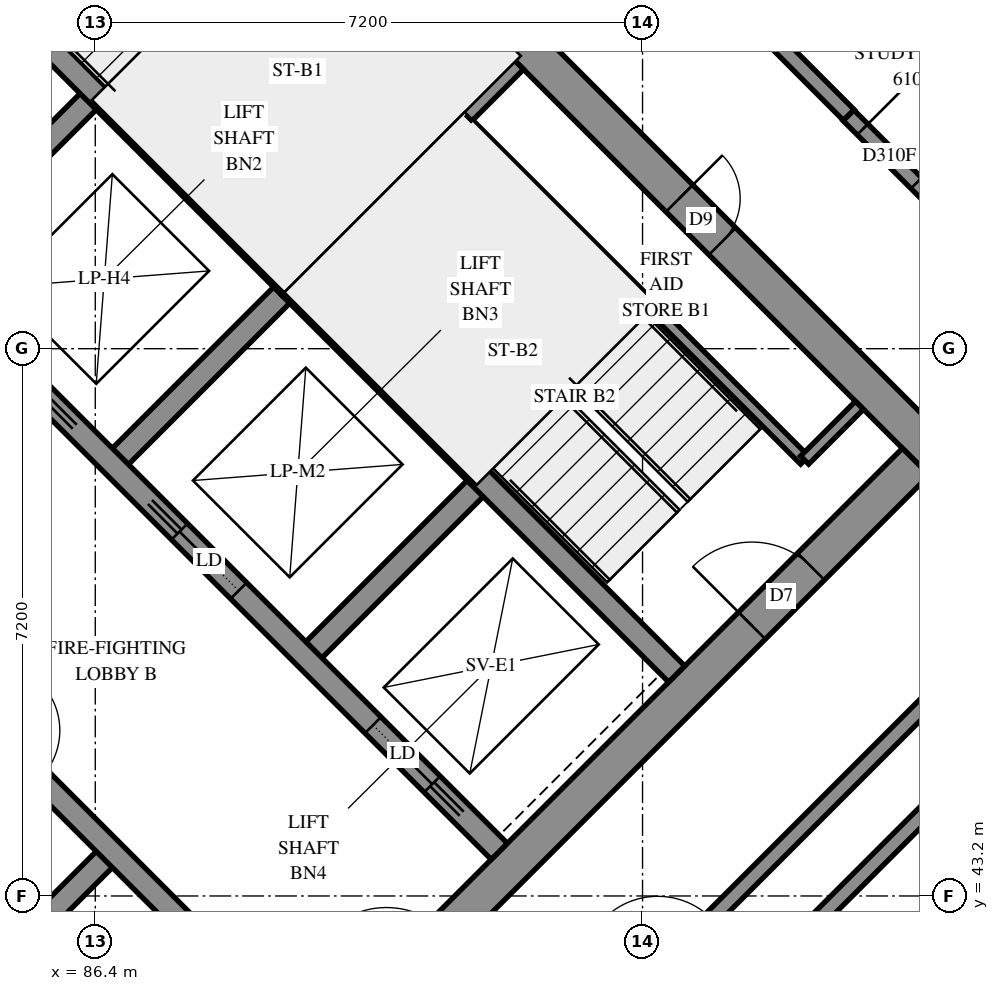
"""IFC4 building model, lengths in metres.
Left out: names, types, materials, properties, quantities, classifications, styles, units other than length and angle.
Written with IfcOpenShell. Run it as: python <this file> out.ifc"""

import sys

from ifc_helpers import new_model, si_unit, direction, frame, frame_2d, origin, place, context, subcontext, project, spatial, rectangle, extrude, element, fill, save


model = new_model("IFC4")
c1 = context("Model", 3, precision=1e-05, world=origin(), true_north=direction((0.0, 1.0)))
c2 = subcontext(c1, "Body", "Model", "MODEL_VIEW")
j1 = project(units=[si_unit("LENGTHUNIT", "METRE"), si_unit("PLANEANGLEUNIT", "RADIAN")], contexts=[c1])
p1 = place(None, origin())
s1 = spatial("IfcSite", under=j1, at=p1, CompositionType="ELEMENT")
p2 = place(p1, origin())
s2 = spatial("IfcBuilding", under=s1, at=p2, CompositionType="ELEMENT")
p3 = place(p2, frame((0.0, 0.0, 223.6)))
s3 = spatial("IfcBuildingStorey", under=s2, at=p3, CompositionType="ELEMENT", Elevation=223.6)
p4 = place(p3, frame((76.124, 49.267, -0.3), z_axis=(0.0, 0.0, 1.0), x_axis=(0.7071067812, -0.7071067812, 0.0)))
e1 = element("IfcWall", 1, at=p4, inside=s3, PredefinedType="SHEAR", context=c2, shape_type="SweptSolid", body=[
    extrude(rectangle(XDim=15.4, YDim=0.5, at=frame_2d((7.7, 0.0))), origin(), (0.0, 0.0, 1.0), 2.7),
])
p5 = place(p3, frame((86.66, 59.802, -0.3), z_axis=(0.0, 0.0, 1.0), x_axis=(0.7071067812, -0.7071067812, 0.0)))
e2 = element("IfcWall", 2, at=p5, inside=s3, PredefinedType="SHEAR", context=c2, shape_type="SweptSolid", body=[
    extrude(rectangle(XDim=15.4, YDim=0.5, at=frame_2d((7.7, 0.0))), origin(), (0.0, 0.0, 1.0), 2.7),
])
p6 = place(p5, frame((10.5, 0.0, 0.3)))
e3 = element("IfcOpeningElement", 3, at=p6, cuts=e2, PredefinedType="OPENING", context=c2, shape_type="SweptSolid", body=[
    extrude(rectangle(XDim=0.8, YDim=2.1, at=frame_2d((0.4, 1.05))), frame((0.0, 0.26, 0.0), z_axis=(0.0, -1.0, 0.0), x_axis=(1.0, 0.0, 0.0)), (0.0, 0.0, 1.0), 0.52),
])
p7 = place(p3, frame((76.478, 49.267, -0.3), z_axis=(0.0, 0.0, 1.0), x_axis=(0.7071067812, 0.7071067812, 0.0)))
e4 = element("IfcWall", 4, at=p7, inside=s3, PredefinedType="SHEAR", context=c2, shape_type="SweptSolid", body=[
    extrude(rectangle(XDim=14.4, YDim=0.5, at=frame_2d((7.2, 0.0))), origin(), (0.0, 0.0, 1.0), 2.7),
])
p8 = place(p7, frame((4.55, 0.0, 0.3)))
e5 = element("IfcOpeningElement", 5, at=p8, cuts=e4, PredefinedType="OPENING", context=c2, shape_type="SweptSolid", body=[
    extrude(rectangle(XDim=1.1, YDim=2.1, at=frame_2d((0.55, 1.05))), frame((0.0, 0.26, 0.0), z_axis=(0.0, -1.0, 0.0), x_axis=(1.0, 0.0, 0.0)), (0.0, 0.0, 1.0), 0.52),
])
p9 = place(p7, frame((11.35, 0.0, 0.3)))
e6 = element("IfcOpeningElement", 6, at=p9, cuts=e4, PredefinedType="OPENING", context=c2, shape_type="SweptSolid", body=[
    extrude(rectangle(XDim=1.1, YDim=2.1, at=frame_2d((0.55, 1.05))), frame((0.0, 0.26, 0.0), z_axis=(0.0, -1.0, 0.0), x_axis=(1.0, 0.0, 0.0)), (0.0, 0.0, 1.0), 0.52),
])
p10 = place(p3, frame((87.013, 38.731, -0.3), z_axis=(0.0, 0.0, 1.0), x_axis=(0.7071067812, 0.7071067812, 0.0)))
e7 = element("IfcWall", 7, at=p10, inside=s3, PredefinedType="SHEAR", context=c2, shape_type="SweptSolid", body=[
    extrude(rectangle(XDim=14.4, YDim=0.5, at=frame_2d((7.2, 0.0))), origin(), (0.0, 0.0, 1.0), 2.7),
])
p11 = place(p10, frame((4.55, 0.0, 0.3)))
e8 = element("IfcOpeningElement", 8, at=p11, cuts=e7, PredefinedType="OPENING", context=c2, shape_type="SweptSolid", body=[
    extrude(rectangle(XDim=1.1, YDim=2.1, at=frame_2d((0.55, 1.05))), frame((0.0, 0.26, 0.0), z_axis=(0.0, -1.0, 0.0), x_axis=(1.0, 0.0, 0.0)), (0.0, 0.0, 1.0), 0.52),
])
p12 = place(p10, frame((11.35, 0.0, 0.3)))
e9 = element("IfcOpeningElement", 9, at=p12, cuts=e7, PredefinedType="OPENING", context=c2, shape_type="SweptSolid", body=[
    extrude(rectangle(XDim=1.1, YDim=2.1, at=frame_2d((0.55, 1.05))), frame((0.0, 0.26, 0.0), z_axis=(0.0, -1.0, 0.0), x_axis=(1.0, 0.0, 0.0)), (0.0, 0.0, 1.0), 0.52),
])
p13 = place(p3, frame((84.079, 51.423, 0.0), z_axis=(0.0, 0.0, 1.0), x_axis=(0.7071219326, 0.7070916295, 0.0)))
e10 = element("IfcWall", 10, at=p13, inside=s3, PredefinedType="SOLIDWALL", context=c2, shape_type="SweptSolid", body=[
    extrude(rectangle(XDim=3.3, YDim=0.3, at=frame_2d((1.65, 0.0))), origin(), (0.0, 0.0, 1.0), 3.1),
])
p14 = place(p3, frame((86.625, 48.878, 0.0), z_axis=(0.0, 0.0, 1.0), x_axis=(0.7071067812, 0.7071067812, 0.0)))
e11 = element("IfcWall", 11, at=p14, inside=s3, PredefinedType="SOLIDWALL", context=c2, shape_type="SweptSolid", body=[
    extrude(rectangle(XDim=3.3, YDim=0.3, at=frame_2d((1.65, 0.0))), origin(), (0.0, 0.0, 1.0), 3.1),
])
p15 = place(p3, frame((84.291, 41.453, 0.0), z_axis=(0.0, 0.0, 1.0), x_axis=(0.7071067812, 0.7071067812, 0.0)))
e12 = element("IfcWall", 12, at=p15, inside=s3, PredefinedType="SOLIDWALL", context=c2, shape_type="SweptSolid", body=[
    extrude(rectangle(XDim=3.3, YDim=0.3, at=frame_2d((1.65, 0.0))), origin(), (0.0, 0.0, 1.0), 3.1),
])
p16 = place(p3, frame((89.17, 46.332, 0.0), z_axis=(0.0, 0.0, 1.0), x_axis=(0.7071067812, 0.7071067812, 0.0)))
e13 = element("IfcWall", 13, at=p16, inside=s3, PredefinedType="SOLIDWALL", context=c2, shape_type="SweptSolid", body=[
    extrude(rectangle(XDim=3.3, YDim=0.3, at=frame_2d((1.65, 0.0))), origin(), (0.0, 0.0, 1.0), 3.1),
])
p17 = place(p3, frame((78.988, 51.423, 0.0), z_axis=(0.0, 0.0, 1.0), x_axis=(0.7071067812, -0.7071067812, 0.0)))
e14 = element("IfcWall", 14, at=p17, inside=s3, PredefinedType="SOLIDWALL", context=c2, shape_type="SweptSolid", body=[
    extrude(rectangle(XDim=14.4, YDim=0.3, at=frame_2d((7.2, 0.0))), origin(), (0.0, 0.0, 1.0), 3.1),
])
p18 = place(p17, frame((1.35, 0.0, 0.0)))
e15 = element("IfcOpeningElement", 15, at=p18, cuts=e14, PredefinedType="OPENING", context=c2, shape_type="SweptSolid", body=[
    extrude(rectangle(XDim=0.9, YDim=2.1, at=frame_2d((0.45, 1.05))), frame((0.0, 0.16, 0.0), z_axis=(0.0, -1.0, 0.0), x_axis=(1.0, 0.0, 0.0)), (0.0, 0.0, 1.0), 0.32),
])
p19 = place(p17, frame((4.95, 0.0, 0.0)))
e16 = element("IfcOpeningElement", 16, at=p19, cuts=e14, PredefinedType="OPENING", context=c2, shape_type="SweptSolid", body=[
    extrude(rectangle(XDim=0.9, YDim=2.1, at=frame_2d((0.45, 1.05))), frame((0.0, 0.16, 0.0), z_axis=(0.0, -1.0, 0.0), x_axis=(1.0, 0.0, 0.0)), (0.0, 0.0, 1.0), 0.32),
])
p20 = place(p17, frame((8.55, 0.0, 0.0)))
e17 = element("IfcOpeningElement", 17, at=p20, cuts=e14, PredefinedType="OPENING", context=c2, shape_type="SweptSolid", body=[
    extrude(rectangle(XDim=0.9, YDim=2.1, at=frame_2d((0.45, 1.05))), frame((0.0, 0.16, 0.0), z_axis=(0.0, -1.0, 0.0), x_axis=(1.0, 0.0, 0.0)), (0.0, 0.0, 1.0), 0.32),
])
p21 = place(p17, frame((12.05, 0.0, 0.0)))
e18 = element("IfcOpeningElement", 18, at=p21, cuts=e14, PredefinedType="OPENING", context=c2, shape_type="SweptSolid", body=[
    extrude(rectangle(XDim=1.1, YDim=2.1, at=frame_2d((0.55, 1.05))), frame((0.0, 0.16, 0.0), z_axis=(0.0, -1.0, 0.0), x_axis=(1.0, 0.0, 0.0)), (0.0, 0.0, 1.0), 0.32),
])
p22 = place(p3, frame((81.534, 53.969, 0.0), z_axis=(0.0, 0.0, 1.0), x_axis=(0.707103309, -0.7071102534, 0.0)))
e19 = element("IfcWall", 19, at=p22, inside=s3, PredefinedType="SOLIDWALL", context=c2, shape_type="SweptSolid", body=[
    extrude(rectangle(XDim=14.4, YDim=0.3, at=frame_2d((7.2, 0.0))), origin(), (0.0, 0.0, 1.0), 3.1),
])
p23 = place(p22, frame((1.25, 0.0, 0.0)))
e20 = element("IfcOpeningElement", 20, at=p23, cuts=e19, PredefinedType="OPENING", context=c2, shape_type="SweptSolid", body=[
    extrude(rectangle(XDim=1.1, YDim=2.1, at=frame_2d((0.55, 1.05))), frame((0.0, 0.16, 0.0), z_axis=(0.0, -1.0, 0.0), x_axis=(1.0, 0.0, 0.0)), (0.0, 0.0, 1.0), 0.32),
])
p24 = place(p22, frame((4.85, 0.0, 0.0)))
e21 = element("IfcOpeningElement", 21, at=p24, cuts=e19, PredefinedType="OPENING", context=c2, shape_type="SweptSolid", body=[
    extrude(rectangle(XDim=1.1, YDim=2.1, at=frame_2d((0.55, 1.05))), frame((0.0, 0.16, 0.0), z_axis=(0.0, -1.0, 0.0), x_axis=(1.0, 0.0, 0.0)), (0.0, 0.0, 1.0), 0.32),
])
p25 = place(p22, frame((8.45, 0.0, 0.0)))
e22 = element("IfcOpeningElement", 22, at=p25, cuts=e19, PredefinedType="OPENING", context=c2, shape_type="SweptSolid", body=[
    extrude(rectangle(XDim=1.1, YDim=2.1, at=frame_2d((0.55, 1.05))), frame((0.0, 0.16, 0.0), z_axis=(0.0, -1.0, 0.0), x_axis=(1.0, 0.0, 0.0)), (0.0, 0.0, 1.0), 0.32),
])
p26 = place(p22, frame((12.05, 0.0, 0.0)))
e23 = element("IfcOpeningElement", 23, at=p26, cuts=e19, PredefinedType="OPENING", context=c2, shape_type="SweptSolid", body=[
    extrude(rectangle(XDim=1.1, YDim=2.1, at=frame_2d((0.55, 1.05))), frame((0.0, 0.16, 0.0), z_axis=(0.0, -1.0, 0.0), x_axis=(1.0, 0.0, 0.0)), (0.0, 0.0, 1.0), 0.32),
])
for number, where, z_axis, x_axis in (
    (24, (83.867, 56.302, 0.0), (0.0, 0.0, 1.0), (0.707, -0.707, 0.0)),
    (25, (88.958, 51.211, 0.0), (0.0, 0.0, 1.0), (0.707, -0.707, 0.0)),
):
    element("IfcWall", number, at=place(p3, frame(where, z_axis=z_axis, x_axis=x_axis)), inside=s3, PredefinedType="SOLIDWALL", context=c2, shape_type="SweptSolid", body=[
        extrude(rectangle(XDim=7.2, YDim=0.3, at=frame_2d((3.6, 0.0))), origin(), (0.0, 0.0, 1.0), 3.1),
    ])
p27 = place(p3, frame((88.958, 51.211, 0.0), z_axis=(0.0, 0.0, 1.0), x_axis=(0.7071067812, 0.7071067812, 0.0)))
e26 = element("IfcWall", 26, at=p27, inside=s3, PredefinedType="SOLIDWALL", context=c2, shape_type="SweptSolid", body=[
    extrude(rectangle(XDim=4.2, YDim=0.3, at=frame_2d((2.1, 0.0))), origin(), (0.0, 0.0, 1.0), 3.1),
])
p28 = place(p3, frame((91.313, 53.354, 0.0), z_axis=(0.0, 0.0, 1.0), x_axis=(0.7071147811, -0.7070987812, 0.0)))
e27 = element("IfcWall", 27, at=p28, inside=s3, PredefinedType="PARTITIONING", context=c2, shape_type="SweptSolid", body=[
    extrude(rectangle(XDim=6.25, YDim=0.15, at=frame_2d((3.125, 0.0))), origin(), (0.0, 0.0, 1.0), 3.1),
])
p29 = place(p3, frame((95.732, 48.934, 0.0), z_axis=(0.0, 0.0, 1.0), x_axis=(0.7071067812, 0.7071067812, 0.0)))
e28 = element("IfcWall", 28, at=p29, inside=s3, PredefinedType="PARTITIONING", context=c2, shape_type="SweptSolid", body=[
    extrude(rectangle(XDim=1.02, YDim=0.15, at=frame_2d((0.51, 0.0))), origin(), (0.0, 0.0, 1.0), 3.1),
])
p30 = place(p3, frame((93.625, 42.021, 0.0), z_axis=(0.0, 0.0, 1.0), x_axis=(0.7071067812, 0.7071067812, 0.0)))
e29 = element("IfcWall", 29, at=p30, inside=s3, PredefinedType="PARTITIONING", context=c2, shape_type="SweptSolid", body=[
    extrude(rectangle(XDim=9.998, YDim=0.2, at=frame_2d((4.999, 0.0))), origin(), (0.0, 0.0, 1.0), 3.1),
])
p31 = place(p30, frame((0.248, 0.0, 0.0)))
e30 = element("IfcOpeningElement", 30, at=p31, cuts=e29, PredefinedType="OPENING", context=c2, shape_type="SweptSolid", body=[
    extrude(rectangle(XDim=1.0, YDim=2.1, at=frame_2d((0.5, 1.05))), frame((0.0, 0.11, 0.0), z_axis=(0.0, -1.0, 0.0), x_axis=(1.0, 0.0, 0.0)), (0.0, 0.0, 1.0), 0.22),
])
p32 = place(p3, frame((94.331, 41.313, 0.0), z_axis=(0.0, 0.0, 1.0), x_axis=(0.7072516979, 0.7069618347, 0.0)))
e31 = element("IfcWall", 31, at=p32, inside=s3, PredefinedType="PARTITIONING", context=c2, shape_type="SweptSolid", body=[
    extrude(rectangle(XDim=6.9, YDim=0.2, at=frame_2d((3.45, 0.0))), origin(), (0.0, 0.0, 1.0), 3.1),
])
p33 = place(p3, frame((96.309, 53.471, 0.0), z_axis=(0.0, 0.0, 1.0), x_axis=(0.7071067812, -0.7071067812, 0.0)))
e32 = element("IfcWall", 32, at=p33, inside=s3, PredefinedType="PARTITIONING", context=c2, shape_type="SweptSolid", body=[
    extrude(rectangle(XDim=6.2, YDim=0.2, at=frame_2d((3.1, 0.0))), origin(), (0.0, 0.0, 1.0), 3.1),
])
p34 = place(p33, frame((0.263, 0.0, 0.0)))
e33 = element("IfcOpeningElement", 33, at=p34, cuts=e32, PredefinedType="OPENING", context=c2, shape_type="SweptSolid", body=[
    extrude(rectangle(XDim=1.0, YDim=2.1, at=frame_2d((0.5, 1.05))), frame((0.0, 0.11, 0.0), z_axis=(0.0, -1.0, 0.0), x_axis=(1.0, 0.0, 0.0)), (0.0, 0.0, 1.0), 0.22),
])
p35 = place(p3, frame((95.041, 54.749, 0.0), z_axis=(0.0, 0.0, 1.0), x_axis=(0.7065510983, -0.7076620277, 0.0)))
e34 = element("IfcWall", 34, at=p35, inside=s3, PredefinedType="PARTITIONING", context=c2, shape_type="SweptSolid", body=[
    extrude(rectangle(XDim=1.8, YDim=0.2, at=frame_2d((0.9, 0.0))), origin(), (0.0, 0.0, 1.0), 3.1),
])
p36 = place(p6, origin())
e35 = element("IfcDoor", 35, at=p36, inside=s3, OperationType="SINGLE_SWING_RIGHT", PredefinedType="DOOR", context=c2, shape_type="SweptSolid", body=[
    extrude(rectangle(XDim=0.8, YDim=2.1, at=frame_2d((0.4, 1.05))), frame((0.0, 0.025, 0.0), z_axis=(0.0, -1.0, 0.0), x_axis=(1.0, 0.0, 0.0)), (0.0, 0.0, 1.0), 0.05),
])
fill(e3, e35)
p37 = place(p12, origin())
e36 = element("IfcDoor", 36, at=p37, inside=s3, OperationType="SINGLE_SWING_RIGHT", PredefinedType="DOOR", context=c2, shape_type="SweptSolid", body=[
    extrude(rectangle(XDim=1.1, YDim=2.1, at=frame_2d((0.55, 1.05))), frame((0.0, 0.025, 0.0), z_axis=(0.0, -1.0, 0.0), x_axis=(1.0, 0.0, 0.0)), (0.0, 0.0, 1.0), 0.05),
])
fill(e9, e36)
p38 = place(p25, origin())
e37 = element("IfcDoor", 37, at=p38, inside=s3, OperationType="SLIDING_TO_LEFT", PredefinedType="DOOR", context=c2, shape_type="SweptSolid", body=[
    extrude(rectangle(XDim=1.1, YDim=2.1, at=frame_2d((0.55, 1.05))), frame((0.0, 0.025, 0.0), z_axis=(0.0, -1.0, 0.0), x_axis=(1.0, 0.0, 0.0)), (0.0, 0.0, 1.0), 0.05),
])
fill(e22, e37)
p39 = place(p26, origin())
e38 = element("IfcDoor", 38, at=p39, inside=s3, OperationType="SLIDING_TO_RIGHT", PredefinedType="DOOR", context=c2, shape_type="SweptSolid", body=[
    extrude(rectangle(XDim=1.1, YDim=2.1, at=frame_2d((0.55, 1.05))), frame((0.0, 0.025, 0.0), z_axis=(0.0, -1.0, 0.0), x_axis=(1.0, 0.0, 0.0)), (0.0, 0.0, 1.0), 0.05),
])
fill(e23, e38)
p40 = place(p34, origin())
e39 = element("IfcDoor", 39, at=p40, inside=s3, OperationType="SINGLE_SWING_LEFT", PredefinedType="DOOR", context=c2, shape_type="SweptSolid", body=[
    extrude(rectangle(XDim=1.0, YDim=2.1, at=frame_2d((0.5, 1.05))), frame((0.0, 0.025, 0.0), z_axis=(0.0, -1.0, 0.0), x_axis=(1.0, 0.0, 0.0)), (0.0, 0.0, 1.0), 0.05),
])
fill(e33, e39)
save(model, sys.argv[1])
